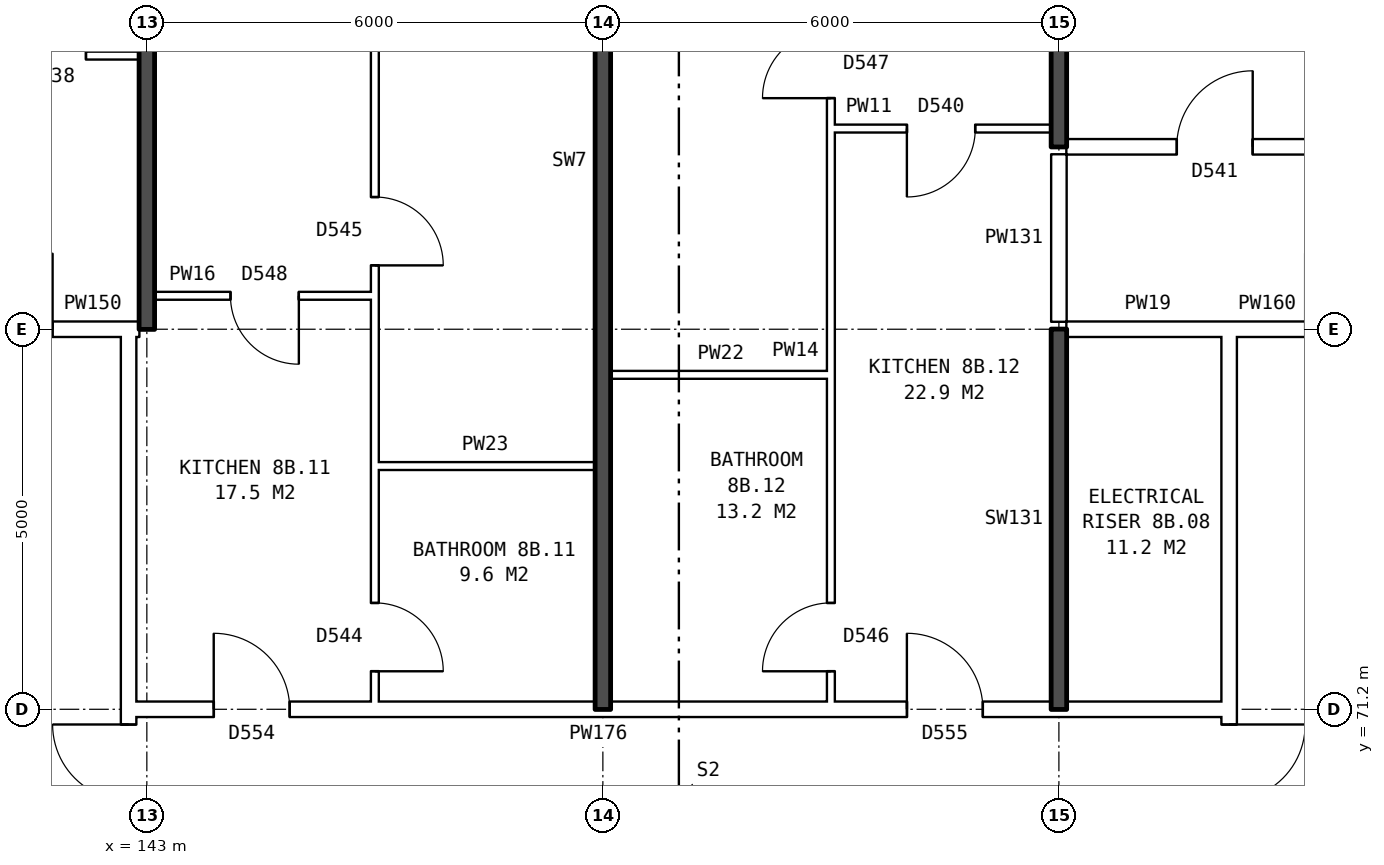
"""IFC4 building model, lengths in metres.
Left out: names, types, materials, properties, quantities, classifications, styles, units other than length and angle.
Written with IfcOpenShell. Run it as: python <this file> out.ifc"""

import sys

from ifc_helpers import new_model, si_unit, direction, frame, frame_2d, origin, place, context, subcontext, project, spatial, rectangle, extrude, element, fill, save


model = new_model("IFC4")
c1 = context("Model", 3, precision=1e-05, world=origin(), true_north=direction((0.0, 1.0)))
c2 = subcontext(c1, "Body", "Model", "MODEL_VIEW")
j1 = project(units=[si_unit("LENGTHUNIT", "METRE"), si_unit("PLANEANGLEUNIT", "RADIAN")], contexts=[c1])
p1 = place(None, origin())
s1 = spatial("IfcSite", under=j1, at=p1, CompositionType="ELEMENT")
p2 = place(p1, origin())
s2 = spatial("IfcBuilding", under=s1, at=p2, CompositionType="ELEMENT")
p3 = place(p2, frame((0.0, 0.0, 31.9)))
s3 = spatial("IfcBuildingStorey", under=s2, at=p3, CompositionType="ELEMENT", Elevation=31.9)
p4 = place(p3, frame((142.76, 63.9, 0.0), z_axis=(0.0, 0.0, 1.0), x_axis=(0.0, 1.0, 0.0)))
e1 = element("IfcWall", 1, at=p4, inside=s3, PredefinedType="PARTITIONING", context=c2, shape_type="SweptSolid", body=[
    extrude(rectangle(XDim=12.2, YDim=0.2, at=frame_2d((6.1, 0.0))), origin(), (0.0, 0.0, 1.0), 2.85),
])
p5 = place(p4, frame((5.1, 0.0, 0.0)))
e2 = element("IfcOpeningElement", 2, at=p5, cuts=e1, PredefinedType="OPENING", context=c2, shape_type="SweptSolid", body=[
    extrude(rectangle(XDim=2.0, YDim=2.1, at=frame_2d((1.0, 1.05))), frame((0.0, 0.11, 0.0), z_axis=(0.0, -1.0, 0.0), x_axis=(1.0, 0.0, 0.0)), (0.0, 0.0, 1.0), 0.22),
])
p6 = place(p3, frame((157.24, 63.9, 0.0), z_axis=(0.0, 0.0, 1.0), x_axis=(0.0, 1.0, 0.0)))
e3 = element("IfcWall", 3, at=p6, inside=s3, PredefinedType="PARTITIONING", context=c2, shape_type="SweptSolid", body=[
    extrude(rectangle(XDim=12.2, YDim=0.2, at=frame_2d((6.1, 0.0))), origin(), (0.0, 0.0, 1.0), 2.85),
])
p7 = place(p6, frame((5.1, 0.0, 0.0)))
e4 = element("IfcOpeningElement", 4, at=p7, cuts=e3, PredefinedType="OPENING", context=c2, shape_type="SweptSolid", body=[
    extrude(rectangle(XDim=2.0, YDim=2.1, at=frame_2d((1.0, 1.05))), frame((0.0, 0.11, 0.0), z_axis=(0.0, -1.0, 0.0), x_axis=(1.0, 0.0, 0.0)), (0.0, 0.0, 1.0), 0.22),
])
p8 = place(p3, frame((142.76, 71.2, 0.0), z_axis=(0.0, 0.0, 1.0), x_axis=(1.0, 0.0, 0.0)))
e5 = element("IfcWall", 5, at=p8, inside=s3, PredefinedType="PARTITIONING", context=c2, shape_type="SweptSolid", body=[
    extrude(rectangle(XDim=14.48, YDim=0.2, at=frame_2d((7.24, 0.0))), origin(), (0.0, 0.0, 1.0), 2.85),
])
p9 = place(p8, frame((1.12, 0.0, 0.0)))
e6 = element("IfcOpeningElement", 6, at=p9, cuts=e5, PredefinedType="OPENING", context=c2, shape_type="SweptSolid", body=[
    extrude(rectangle(XDim=1.0, YDim=2.1, at=frame_2d((0.5, 1.05))), frame((0.0, 0.11, 0.0), z_axis=(0.0, -1.0, 0.0), x_axis=(1.0, 0.0, 0.0)), (0.0, 0.0, 1.0), 0.22),
])
p10 = place(p8, frame((10.24, 0.0, 0.0)))
e7 = element("IfcOpeningElement", 7, at=p10, cuts=e5, PredefinedType="OPENING", context=c2, shape_type="SweptSolid", body=[
    extrude(rectangle(XDim=1.0, YDim=2.1, at=frame_2d((0.5, 1.05))), frame((0.0, 0.11, 0.0), z_axis=(0.0, -1.0, 0.0), x_axis=(1.0, 0.0, 0.0)), (0.0, 0.0, 1.0), 0.22),
])
for number, where, z_axis, x_axis in (
    (8, (146.0, 74.4, 0.0), (0.0, 0.0, 1.0), (1.0, 0.0, 0.0)),
    (9, (149.1, 75.6, 0.0), (0.0, 0.0, 1.0), (1.0, 0.0, 0.0)),
):
    element("IfcWall", number, at=place(p3, frame(where, z_axis=z_axis, x_axis=x_axis)), inside=s3, PredefinedType="PARTITIONING", context=c2, shape_type="SweptSolid", body=[
        extrude(rectangle(XDim=2.9, YDim=0.1, at=frame_2d((1.45, 0.0))), origin(), (0.0, 0.0, 1.0), 2.85),
    ])
p11 = place(p3, frame((139.76, 76.2, 0.0), z_axis=(0.0, 0.0, 1.0), x_axis=(1.0, 0.0, 0.0)))
e10 = element("IfcWall", 10, at=p11, inside=s3, PredefinedType="PARTITIONING", context=c2, shape_type="SweptSolid", body=[
    extrude(rectangle(XDim=3.0, YDim=0.2, at=frame_2d((1.5, 0.0))), origin(), (0.0, 0.0, 1.0), 2.85),
])
p12 = place(p11, frame((1.0, 0.0, 0.0)))
e11 = element("IfcOpeningElement", 11, at=p12, cuts=e10, PredefinedType="OPENING", context=c2, shape_type="SweptSolid", body=[
    extrude(rectangle(XDim=1.0, YDim=2.1, at=frame_2d((0.5, 1.05))), frame((0.0, 0.11, 0.0), z_axis=(0.0, -1.0, 0.0), x_axis=(1.0, 0.0, 0.0)), (0.0, 0.0, 1.0), 0.22),
])
p13 = place(p3, frame((142.76, 76.2, 0.0), z_axis=(0.0, 0.0, 1.0), x_axis=(1.0, 0.0, 0.0)))
e12 = element("IfcWall", 12, at=p13, inside=s3, PredefinedType="PARTITIONING", context=c2, shape_type="SweptSolid", body=[
    extrude(rectangle(XDim=0.14, YDim=0.2, at=frame_2d((0.07, 0.0))), origin(), (0.0, 0.0, 1.0), 2.85),
])
p14 = place(p3, frame((155.1, 76.2, 0.0), z_axis=(0.0, 0.0, 1.0), x_axis=(1.0, 0.0, 0.0)))
e13 = element("IfcWall", 13, at=p14, inside=s3, PredefinedType="PARTITIONING", context=c2, shape_type="SweptSolid", body=[
    extrude(rectangle(XDim=2.14, YDim=0.2, at=frame_2d((1.07, 0.0))), origin(), (0.0, 0.0, 1.0), 2.85),
])
p15 = place(p3, frame((157.24, 76.2, 0.0), z_axis=(0.0, 0.0, 1.0), x_axis=(1.0, 0.0, 0.0)))
e14 = element("IfcWall", 14, at=p15, inside=s3, PredefinedType="PARTITIONING", context=c2, shape_type="SweptSolid", body=[
    extrude(rectangle(XDim=3.0, YDim=0.2, at=frame_2d((1.5, 0.0))), origin(), (0.0, 0.0, 1.0), 2.85),
])
p16 = place(p15, frame((1.0, 0.0, 0.0)))
e15 = element("IfcOpeningElement", 15, at=p16, cuts=e14, PredefinedType="OPENING", context=c2, shape_type="SweptSolid", body=[
    extrude(rectangle(XDim=1.0, YDim=2.1, at=frame_2d((0.5, 1.05))), frame((0.0, 0.11, 0.0), z_axis=(0.0, -1.0, 0.0), x_axis=(1.0, 0.0, 0.0)), (0.0, 0.0, 1.0), 0.22),
])
p17 = place(p3, frame((143.1, 76.64, 0.0), z_axis=(0.0, 0.0, 1.0), x_axis=(1.0, 0.0, 0.0)))
e16 = element("IfcWall", 16, at=p17, inside=s3, PredefinedType="PARTITIONING", context=c2, shape_type="SweptSolid", body=[
    extrude(rectangle(XDim=2.9, YDim=0.1, at=frame_2d((1.45, 0.0))), origin(), (0.0, 0.0, 1.0), 2.85),
])
p18 = place(p17, frame((1.0, 0.0, 0.0)))
e17 = element("IfcOpeningElement", 17, at=p18, cuts=e16, PredefinedType="OPENING", context=c2, shape_type="SweptSolid", body=[
    extrude(rectangle(XDim=0.9, YDim=2.1, at=frame_2d((0.45, 1.05))), frame((0.0, 0.06, 0.0), z_axis=(0.0, -1.0, 0.0), x_axis=(1.0, 0.0, 0.0)), (0.0, 0.0, 1.0), 0.12),
])
p19 = place(p3, frame((155.1, 78.6, 0.0), z_axis=(0.0, 0.0, 1.0), x_axis=(1.0, 0.0, 0.0)))
e18 = element("IfcWall", 18, at=p19, inside=s3, PredefinedType="PARTITIONING", context=c2, shape_type="SweptSolid", body=[
    extrude(rectangle(XDim=22.29, YDim=0.2, at=frame_2d((11.145, 0.0))), origin(), (0.0, 0.0, 1.0), 2.85),
])
p20 = place(p19, frame((1.45, 0.0, 0.0)))
e19 = element("IfcOpeningElement", 19, at=p20, cuts=e18, PredefinedType="OPENING", context=c2, shape_type="SweptSolid", body=[
    extrude(rectangle(XDim=1.0, YDim=2.1, at=frame_2d((0.5, 1.05))), frame((0.0, 0.11, 0.0), z_axis=(0.0, -1.0, 0.0), x_axis=(1.0, 0.0, 0.0)), (0.0, 0.0, 1.0), 0.22),
])
p21 = place(p19, frame((7.4, 0.0, 0.0)))
e20 = element("IfcOpeningElement", 20, at=p21, cuts=e18, PredefinedType="OPENING", context=c2, shape_type="SweptSolid", body=[
    extrude(rectangle(XDim=1.0, YDim=2.1, at=frame_2d((0.5, 1.05))), frame((0.0, 0.11, 0.0), z_axis=(0.0, -1.0, 0.0), x_axis=(1.0, 0.0, 0.0)), (0.0, 0.0, 1.0), 0.22),
])
p22 = place(p19, frame((14.4, 0.0, 0.0)))
e21 = element("IfcOpeningElement", 21, at=p22, cuts=e18, PredefinedType="OPENING", context=c2, shape_type="SweptSolid", body=[
    extrude(rectangle(XDim=1.0, YDim=2.1, at=frame_2d((0.5, 1.05))), frame((0.0, 0.11, 0.0), z_axis=(0.0, -1.0, 0.0), x_axis=(1.0, 0.0, 0.0)), (0.0, 0.0, 1.0), 0.22),
])
p23 = place(p3, frame((152.0, 78.84, 0.0), z_axis=(0.0, 0.0, 1.0), x_axis=(1.0, 0.0, 0.0)))
e22 = element("IfcWall", 22, at=p23, inside=s3, PredefinedType="PARTITIONING", context=c2, shape_type="SweptSolid", body=[
    extrude(rectangle(XDim=2.9, YDim=0.1, at=frame_2d((1.45, 0.0))), origin(), (0.0, 0.0, 1.0), 2.85),
])
p24 = place(p23, frame((1.0, 0.0, 0.0)))
e23 = element("IfcOpeningElement", 23, at=p24, cuts=e22, PredefinedType="OPENING", context=c2, shape_type="SweptSolid", body=[
    extrude(rectangle(XDim=0.9, YDim=2.1, at=frame_2d((0.45, 1.05))), frame((0.0, 0.06, 0.0), z_axis=(0.0, -1.0, 0.0), x_axis=(1.0, 0.0, 0.0)), (0.0, 0.0, 1.0), 0.12),
])
p25 = place(p3, frame((137.1, 79.8, 0.0), z_axis=(0.0, 0.0, 1.0), x_axis=(1.0, 0.0, 0.0)))
e24 = element("IfcWall", 24, at=p25, inside=s3, PredefinedType="PARTITIONING", context=c2, shape_type="SweptSolid", body=[
    extrude(rectangle(XDim=5.8, YDim=0.1, at=frame_2d((2.9, 0.0))), origin(), (0.0, 0.0, 1.0), 2.85),
])
p26 = place(p25, frame((1.3, 0.0, 0.0)))
e25 = element("IfcOpeningElement", 25, at=p26, cuts=e24, PredefinedType="OPENING", context=c2, shape_type="SweptSolid", body=[
    extrude(rectangle(XDim=0.9, YDim=2.1, at=frame_2d((0.45, 1.05))), frame((0.0, 0.06, 0.0), z_axis=(0.0, -1.0, 0.0), x_axis=(1.0, 0.0, 0.0)), (0.0, 0.0, 1.0), 0.12),
])
p27 = place(p25, frame((4.2, 0.0, 0.0)))
e26 = element("IfcOpeningElement", 26, at=p27, cuts=e24, PredefinedType="OPENING", context=c2, shape_type="SweptSolid", body=[
    extrude(rectangle(XDim=0.9, YDim=2.1, at=frame_2d((0.45, 1.05))), frame((0.0, 0.06, 0.0), z_axis=(0.0, -1.0, 0.0), x_axis=(1.0, 0.0, 0.0)), (0.0, 0.0, 1.0), 0.12),
])
p28 = place(p3, frame((143.0, 76.2, 0.0), z_axis=(0.0, 0.0, 1.0), x_axis=(0.0, 1.0, 0.0)))
e27 = element("IfcWall", 27, at=p28, inside=s3, PredefinedType="SOLIDWALL", context=c2, shape_type="SweptSolid", body=[
    extrude(rectangle(XDim=9.44, YDim=0.2, at=frame_2d((4.72, 0.0))), origin(), (0.0, 0.0, 1.0), 2.85),
])
p29 = place(p3, frame((146.0, 71.3, 0.0), z_axis=(0.0, 0.0, 1.0), x_axis=(0.0, 1.0, 0.0)))
e28 = element("IfcWall", 28, at=p29, inside=s3, PredefinedType="PARTITIONING", context=c2, shape_type="SweptSolid", body=[
    extrude(rectangle(XDim=14.34, YDim=0.1, at=frame_2d((7.17, 0.0))), origin(), (0.0, 0.0, 1.0), 2.85),
])
p30 = place(p29, frame((5.74, 0.0, 0.0)))
e29 = element("IfcOpeningElement", 29, at=p30, cuts=e28, PredefinedType="OPENING", context=c2, shape_type="SweptSolid", body=[
    extrude(rectangle(XDim=0.9, YDim=2.1, at=frame_2d((0.45, 1.05))), frame((0.0, 0.06, 0.0), z_axis=(0.0, -1.0, 0.0), x_axis=(1.0, 0.0, 0.0)), (0.0, 0.0, 1.0), 0.12),
])
p31 = place(p29, frame((0.4, 0.0, 0.0)))
e30 = element("IfcOpeningElement", 30, at=p31, cuts=e28, PredefinedType="OPENING", context=c2, shape_type="SweptSolid", body=[
    extrude(rectangle(XDim=0.9, YDim=2.1, at=frame_2d((0.45, 1.05))), frame((0.0, 0.06, 0.0), z_axis=(0.0, -1.0, 0.0), x_axis=(1.0, 0.0, 0.0)), (0.0, 0.0, 1.0), 0.12),
])
p32 = place(p3, frame((149.0, 71.2, 0.0), z_axis=(0.0, 0.0, 1.0), x_axis=(0.0, 1.0, 0.0)))
e31 = element("IfcWall", 31, at=p32, inside=s3, PredefinedType="SOLIDWALL", context=c2, shape_type="SweptSolid", body=[
    extrude(rectangle(XDim=14.44, YDim=0.2, at=frame_2d((7.22, 0.0))), origin(), (0.0, 0.0, 1.0), 2.85),
])
p33 = place(p3, frame((152.0, 71.3, 0.0), z_axis=(0.0, 0.0, 1.0), x_axis=(0.0, 1.0, 0.0)))
e32 = element("IfcWall", 32, at=p33, inside=s3, PredefinedType="PARTITIONING", context=c2, shape_type="SweptSolid", body=[
    extrude(rectangle(XDim=14.34, YDim=0.1, at=frame_2d((7.17, 0.0))), origin(), (0.0, 0.0, 1.0), 2.85),
])
p34 = place(p33, frame((7.94, 0.0, 0.0)))
e33 = element("IfcOpeningElement", 33, at=p34, cuts=e32, PredefinedType="OPENING", context=c2, shape_type="SweptSolid", body=[
    extrude(rectangle(XDim=0.9, YDim=2.1, at=frame_2d((0.45, 1.05))), frame((0.0, 0.06, 0.0), z_axis=(0.0, -1.0, 0.0), x_axis=(1.0, 0.0, 0.0)), (0.0, 0.0, 1.0), 0.12),
])
p35 = place(p33, frame((0.4, 0.0, 0.0)))
e34 = element("IfcOpeningElement", 34, at=p35, cuts=e32, PredefinedType="OPENING", context=c2, shape_type="SweptSolid", body=[
    extrude(rectangle(XDim=0.9, YDim=2.1, at=frame_2d((0.45, 1.05))), frame((0.0, 0.06, 0.0), z_axis=(0.0, -1.0, 0.0), x_axis=(1.0, 0.0, 0.0)), (0.0, 0.0, 1.0), 0.12),
])
p36 = place(p3, frame((155.0, 71.2, 0.0), z_axis=(0.0, 0.0, 1.0), x_axis=(0.0, 1.0, 0.0)))
e35 = element("IfcWall", 35, at=p36, inside=s3, PredefinedType="SOLIDWALL", context=c2, shape_type="SweptSolid", body=[
    extrude(rectangle(XDim=5.0, YDim=0.2, at=frame_2d((2.5, 0.0))), origin(), (0.0, 0.0, 1.0), 2.85),
])
p37 = place(p3, frame((155.0, 76.3, 0.0), z_axis=(0.0, 0.0, 1.0), x_axis=(0.0, 1.0, 0.0)))
e36 = element("IfcWall", 36, at=p37, inside=s3, PredefinedType="PARTITIONING", context=c2, shape_type="SweptSolid", body=[
    extrude(rectangle(XDim=2.2, YDim=0.2, at=frame_2d((1.1, 0.0))), origin(), (0.0, 0.0, 1.0), 2.85),
])
p38 = place(p3, frame((155.0, 78.6, 0.0), z_axis=(0.0, 0.0, 1.0), x_axis=(0.0, 1.0, 0.0)))
e37 = element("IfcWall", 37, at=p38, inside=s3, PredefinedType="SOLIDWALL", context=c2, shape_type="SweptSolid", body=[
    extrude(rectangle(XDim=7.04, YDim=0.2, at=frame_2d((3.52, 0.0))), origin(), (0.0, 0.0, 1.0), 2.85),
])
p39 = place(p5, origin())
e38 = element("IfcDoor", 38, at=p39, inside=s3, OperationType="DOUBLE_DOOR_SINGLE_SWING", PredefinedType="DOOR", context=c2, shape_type="SweptSolid", body=[
    extrude(rectangle(XDim=2.0, YDim=2.1, at=frame_2d((1.0, 1.05))), frame((0.0, 0.025, 0.0), z_axis=(0.0, -1.0, 0.0), x_axis=(1.0, 0.0, 0.0)), (0.0, 0.0, 1.0), 0.05),
])
fill(e2, e38)
p40 = place(p7, frame((2.0, 0.0, 0.0), z_axis=(0.0, 0.0, 1.0), x_axis=(-1.0, 0.0, 0.0)))
e39 = element("IfcDoor", 39, at=p40, inside=s3, OperationType="DOUBLE_DOOR_SINGLE_SWING", PredefinedType="DOOR", context=c2, shape_type="SweptSolid", body=[
    extrude(rectangle(XDim=2.0, YDim=2.1, at=frame_2d((1.0, 1.05))), frame((0.0, 0.025, 0.0), z_axis=(0.0, -1.0, 0.0), x_axis=(1.0, 0.0, 0.0)), (0.0, 0.0, 1.0), 0.05),
])
fill(e4, e39)
p41 = place(p27, origin())
e40 = element("IfcDoor", 40, at=p41, inside=s3, OperationType="SINGLE_SWING_LEFT", PredefinedType="DOOR", context=c2, shape_type="SweptSolid", body=[
    extrude(rectangle(XDim=0.9, YDim=2.1, at=frame_2d((0.45, 1.05))), frame((0.0, 0.025, 0.0), z_axis=(0.0, -1.0, 0.0), x_axis=(1.0, 0.0, 0.0)), (0.0, 0.0, 1.0), 0.05),
])
fill(e26, e40)
p42 = place(p30, frame((0.9, 0.0, 0.0), z_axis=(0.0, 0.0, 1.0), x_axis=(-1.0, 0.0, 0.0)))
e41 = element("IfcDoor", 41, at=p42, inside=s3, OperationType="SINGLE_SWING_RIGHT", PredefinedType="DOOR", context=c2, shape_type="SweptSolid", body=[
    extrude(rectangle(XDim=0.9, YDim=2.1, at=frame_2d((0.45, 1.05))), frame((0.0, 0.025, 0.0), z_axis=(0.0, -1.0, 0.0), x_axis=(1.0, 0.0, 0.0)), (0.0, 0.0, 1.0), 0.05),
])
fill(e29, e41)
p43 = place(p9, origin())
e42 = element("IfcDoor", 42, at=p43, inside=s3, OperationType="SINGLE_SWING_LEFT", PredefinedType="DOOR", context=c2, shape_type="SweptSolid", body=[
    extrude(rectangle(XDim=1.0, YDim=2.1, at=frame_2d((0.5, 1.05))), frame((0.0, 0.025, 0.0), z_axis=(0.0, -1.0, 0.0), x_axis=(1.0, 0.0, 0.0)), (0.0, 0.0, 1.0), 0.05),
])
fill(e6, e42)
p44 = place(p18, frame((0.9, 0.0, 0.0), z_axis=(0.0, 0.0, 1.0), x_axis=(-1.0, 0.0, 0.0)))
e43 = element("IfcDoor", 43, at=p44, inside=s3, OperationType="SINGLE_SWING_LEFT", PredefinedType="DOOR", context=c2, shape_type="SweptSolid", body=[
    extrude(rectangle(XDim=0.9, YDim=2.1, at=frame_2d((0.45, 1.05))), frame((0.0, 0.025, 0.0), z_axis=(0.0, -1.0, 0.0), x_axis=(1.0, 0.0, 0.0)), (0.0, 0.0, 1.0), 0.05),
])
fill(e17, e43)
p45 = place(p31, frame((0.9, 0.0, 0.0), z_axis=(0.0, 0.0, 1.0), x_axis=(-1.0, 0.0, 0.0)))
e44 = element("IfcDoor", 44, at=p45, inside=s3, OperationType="SINGLE_SWING_RIGHT", PredefinedType="DOOR", context=c2, shape_type="SweptSolid", body=[
    extrude(rectangle(XDim=0.9, YDim=2.1, at=frame_2d((0.45, 1.05))), frame((0.0, 0.025, 0.0), z_axis=(0.0, -1.0, 0.0), x_axis=(1.0, 0.0, 0.0)), (0.0, 0.0, 1.0), 0.05),
])
fill(e30, e44)
p46 = place(p34, origin())
e45 = element("IfcDoor", 45, at=p46, inside=s3, OperationType="SINGLE_SWING_LEFT", PredefinedType="DOOR", context=c2, shape_type="SweptSolid", body=[
    extrude(rectangle(XDim=0.9, YDim=2.1, at=frame_2d((0.45, 1.05))), frame((0.0, 0.025, 0.0), z_axis=(0.0, -1.0, 0.0), x_axis=(1.0, 0.0, 0.0)), (0.0, 0.0, 1.0), 0.05),
])
fill(e33, e45)
p47 = place(p10, origin())
e46 = element("IfcDoor", 46, at=p47, inside=s3, OperationType="SINGLE_SWING_LEFT", PredefinedType="DOOR", context=c2, shape_type="SweptSolid", body=[
    extrude(rectangle(XDim=1.0, YDim=2.1, at=frame_2d((0.5, 1.05))), frame((0.0, 0.025, 0.0), z_axis=(0.0, -1.0, 0.0), x_axis=(1.0, 0.0, 0.0)), (0.0, 0.0, 1.0), 0.05),
])
fill(e7, e46)
p48 = place(p24, frame((0.9, 0.0, 0.0), z_axis=(0.0, 0.0, 1.0), x_axis=(-1.0, 0.0, 0.0)))
e47 = element("IfcDoor", 47, at=p48, inside=s3, OperationType="SINGLE_SWING_RIGHT", PredefinedType="DOOR", context=c2, shape_type="SweptSolid", body=[
    extrude(rectangle(XDim=0.9, YDim=2.1, at=frame_2d((0.45, 1.05))), frame((0.0, 0.025, 0.0), z_axis=(0.0, -1.0, 0.0), x_axis=(1.0, 0.0, 0.0)), (0.0, 0.0, 1.0), 0.05),
])
fill(e23, e47)
p49 = place(p35, origin())
e48 = element("IfcDoor", 48, at=p49, inside=s3, OperationType="SINGLE_SWING_LEFT", PredefinedType="DOOR", context=c2, shape_type="SweptSolid", body=[
    extrude(rectangle(XDim=0.9, YDim=2.1, at=frame_2d((0.45, 1.05))), frame((0.0, 0.025, 0.0), z_axis=(0.0, -1.0, 0.0), x_axis=(1.0, 0.0, 0.0)), (0.0, 0.0, 1.0), 0.05),
])
fill(e34, e48)
p50 = place(p20, origin())
e49 = element("IfcDoor", 49, at=p50, inside=s3, OperationType="SINGLE_SWING_RIGHT", PredefinedType="DOOR", context=c2, shape_type="SweptSolid", body=[
    extrude(rectangle(XDim=1.0, YDim=2.1, at=frame_2d((0.5, 1.05))), frame((0.0, 0.025, 0.0), z_axis=(0.0, -1.0, 0.0), x_axis=(1.0, 0.0, 0.0)), (0.0, 0.0, 1.0), 0.05),
])
fill(e19, e49)
save(model, sys.argv[1])
